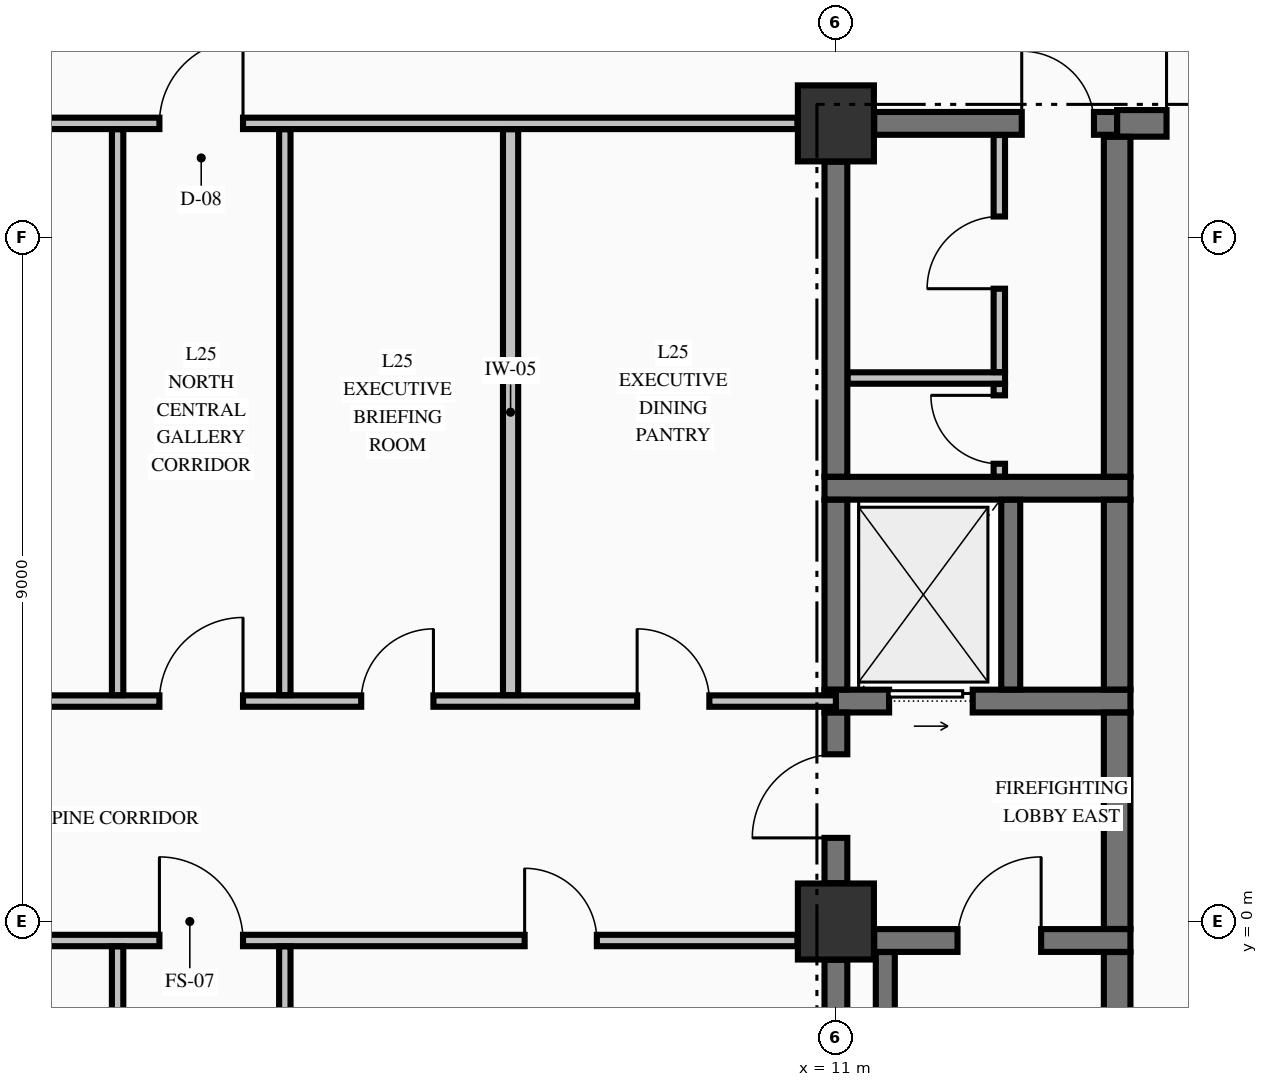
"""IFC4 building model, lengths in metres.
Left out: names, types, materials, properties, quantities, classifications, styles, units other than length and angle.
Written with IfcOpenShell. Run it as: python <this file> out.ifc"""

import sys

from ifc_helpers import new_model, si_unit, direction, frame, frame_2d, origin, origin_2d, place, context, subcontext, project, spatial, rectangle, extrude, element, fill, save


model = new_model("IFC4")
c1 = context("Model", 3, precision=1e-05, world=origin(), true_north=direction((0.0, 1.0)))
c2 = subcontext(c1, "Body", "Model", "MODEL_VIEW")
j1 = project(units=[si_unit("LENGTHUNIT", "METRE"), si_unit("PLANEANGLEUNIT", "RADIAN")], contexts=[c1])
p1 = place(None, origin())
s1 = spatial("IfcSite", under=j1, at=p1, CompositionType="ELEMENT")
p2 = place(p1, origin())
s2 = spatial("IfcBuilding", under=s1, at=p2, CompositionType="ELEMENT")
p3 = place(p2, frame((0.0, 0.0, 102.07)))
s3 = spatial("IfcBuildingStorey", under=s2, at=p3, CompositionType="ELEMENT", Elevation=102.07)
for number, where, z_axis, x_axis in (
    (1, (11.0, 0.0, -0.25), (0.0, 0.0, 1.0), (1.0, 0.0, 0.0)),
    (2, (11.0, 10.5, -0.25), (0.0, 0.0, 1.0), (1.0, 0.0, 0.0)),
):
    element("IfcColumn", number, at=place(p3, frame(where, z_axis=z_axis, x_axis=x_axis)), inside=s3, PredefinedType="COLUMN", context=c2, shape_type="SweptSolid", body=[
        extrude(rectangle(XDim=1.0, YDim=1.0, at=origin_2d()), origin(), (0.0, 0.0, 1.0), 3.57),
    ])
p4 = place(p3, frame((11.504, -0.25, 0.0), z_axis=(0.0, 0.0, 1.0), x_axis=(1.0, 0.0, 0.0)))
e3 = element("IfcWall", 3, at=p4, inside=s3, PredefinedType="SHEAR", context=c2, shape_type="SweptSolid", body=[
    extrude(rectangle(XDim=3.371, YDim=0.3, at=frame_2d((1.686, 0.0))), origin(), (0.0, 0.0, 1.0), 3.32),
])
p5 = place(p4, frame((1.096, 0.0, 0.0)))
e4 = element("IfcOpeningElement", 4, at=p5, cuts=e3, PredefinedType="OPENING", context=c2, shape_type="SweptSolid", body=[
    extrude(rectangle(XDim=1.1, YDim=2.15, at=frame_2d((0.55, 1.075))), frame((0.0, 0.16, 0.0), z_axis=(0.0, -1.0, 0.0), x_axis=(1.0, 0.0, 0.0)), (0.0, 0.0, 1.0), 0.32),
])
p6 = place(p3, frame((10.85, 2.9, 0.0), z_axis=(0.0, 0.0, 1.0), x_axis=(1.0, 0.0, 0.0)))
e5 = element("IfcWall", 5, at=p6, inside=s3, PredefinedType="SHEAR", context=c2, shape_type="SweptSolid", body=[
    extrude(rectangle(XDim=4.025, YDim=0.3, at=frame_2d((2.012, 0.0))), origin(), (0.0, 0.0, 1.0), 3.32),
])
p7 = place(p6, frame((0.85, 0.0, 0.0)))
e6 = element("IfcOpeningElement", 6, at=p7, cuts=e5, PredefinedType="OPENING", context=c2, shape_type="SweptSolid", body=[
    extrude(rectangle(XDim=1.1, YDim=2.2, at=frame_2d((0.55, 1.1))), frame((0.0, 0.16, 0.0), z_axis=(0.0, -1.0, 0.0), x_axis=(1.0, 0.0, 0.0)), (0.0, 0.0, 1.0), 0.32),
])
p8 = place(p3, frame((10.85, 5.7, 0.0), z_axis=(0.0, 0.0, 1.0), x_axis=(1.0, 0.0, 0.0)))
e7 = element("IfcWall", 7, at=p8, inside=s3, PredefinedType="SHEAR", context=c2, shape_type="SweptSolid", body=[
    extrude(rectangle(XDim=4.025, YDim=0.3, at=frame_2d((2.012, 0.0))), origin(), (0.0, 0.0, 1.0), 3.32),
])
p9 = place(p3, frame((11.504, 10.5, 0.0), z_axis=(0.0, 0.0, 1.0), x_axis=(1.0, 0.0, 0.0)))
e8 = element("IfcWall", 8, at=p9, inside=s3, PredefinedType="SHEAR", context=c2, shape_type="SweptSolid", body=[
    extrude(rectangle(XDim=3.196, YDim=0.3, at=frame_2d((1.598, 0.0))), origin(), (0.0, 0.0, 1.0), 3.32),
])
p10 = place(p9, frame((1.941, 0.0, 0.0)))
e9 = element("IfcOpeningElement", 9, at=p10, cuts=e8, PredefinedType="OPENING", context=c2, shape_type="SweptSolid", body=[
    extrude(rectangle(XDim=0.95, YDim=2.15, at=frame_2d((0.475, 1.075))), frame((0.0, 0.16, 0.0), z_axis=(0.0, -1.0, 0.0), x_axis=(1.0, 0.0, 0.0)), (0.0, 0.0, 1.0), 0.32),
])
p11 = place(p3, frame((14.7, 10.5, 0.0), z_axis=(0.0, 0.0, 1.0), x_axis=(1.0, 0.0, 0.0)))
e10 = element("IfcWall", 10, at=p11, inside=s3, PredefinedType="SHEAR", context=c2, shape_type="SweptSolid", body=[
    extrude(rectangle(XDim=4.796, YDim=0.35, at=frame_2d((2.398, 0.0))), origin(), (0.0, 0.0, 1.0), 3.32),
])
p12 = place(p11, frame((0.65, 0.0, 0.0)))
e11 = element("IfcOpeningElement", 11, at=p12, cuts=e10, PredefinedType="OPENING", context=c2, shape_type="SweptSolid", body=[
    extrude(rectangle(XDim=1.2, YDim=2.15, at=frame_2d((0.6, 1.075))), frame((0.0, 0.185, 0.0), z_axis=(0.0, -1.0, 0.0), x_axis=(1.0, 0.0, 0.0)), (0.0, 0.0, 1.0), 0.37),
])
p13 = place(p11, frame((3.225, 0.0, 0.0)))
e12 = element("IfcOpeningElement", 12, at=p13, cuts=e10, PredefinedType="OPENING", context=c2, shape_type="SweptSolid", body=[
    extrude(rectangle(XDim=0.95, YDim=2.15, at=frame_2d((0.475, 1.075))), frame((0.0, 0.185, 0.0), z_axis=(0.0, -1.0, 0.0), x_axis=(1.0, 0.0, 0.0)), (0.0, 0.0, 1.0), 0.37),
])
p14 = place(p3, frame((-10.494, -0.25, 0.0), z_axis=(0.0, 0.0, 1.0), x_axis=(1.0, 0.0, 0.0)))
e13 = element("IfcWall", 13, at=p14, inside=s3, PredefinedType="PARTITIONING", context=c2, shape_type="SweptSolid", body=[
    extrude(rectangle(XDim=20.988, YDim=0.15, at=frame_2d((10.494, 0.0))), origin(), (0.0, 0.0, 1.0), 3.32),
])
p15 = place(p14, frame((12.594, 0.0, 0.0)))
e14 = element("IfcOpeningElement", 14, at=p15, cuts=e13, PredefinedType="OPENING", context=c2, shape_type="SweptSolid", body=[
    extrude(rectangle(XDim=1.1, YDim=2.15, at=frame_2d((0.55, 1.075))), frame((0.0, 0.085, 0.0), z_axis=(0.0, -1.0, 0.0), x_axis=(1.0, 0.0, 0.0)), (0.0, 0.0, 1.0), 0.17),
])
p16 = place(p14, frame((5.249, 0.0, 0.0)))
e15 = element("IfcOpeningElement", 15, at=p16, cuts=e13, PredefinedType="OPENING", context=c2, shape_type="SweptSolid", body=[
    extrude(rectangle(XDim=1.05, YDim=2.15, at=frame_2d((0.525, 1.075))), frame((0.0, 0.085, 0.0), z_axis=(0.0, -1.0, 0.0), x_axis=(1.0, 0.0, 0.0)), (0.0, 0.0, 1.0), 0.17),
])
p17 = place(p14, frame((17.399, 0.0, 0.0)))
e16 = element("IfcOpeningElement", 16, at=p17, cuts=e13, PredefinedType="OPENING", context=c2, shape_type="SweptSolid", body=[
    extrude(rectangle(XDim=0.95, YDim=2.15, at=frame_2d((0.475, 1.075))), frame((0.0, 0.085, 0.0), z_axis=(0.0, -1.0, 0.0), x_axis=(1.0, 0.0, 0.0)), (0.0, 0.0, 1.0), 0.17),
])
p18 = place(p3, frame((-11.0, 2.9, 0.0), z_axis=(0.0, 0.0, 1.0), x_axis=(1.0, 0.0, 0.0)))
e17 = element("IfcWall", 17, at=p18, inside=s3, PredefinedType="PARTITIONING", context=c2, shape_type="SweptSolid", body=[
    extrude(rectangle(XDim=22.0, YDim=0.15, at=frame_2d((11.0, 0.0))), origin(), (0.0, 0.0, 1.0), 3.32),
])
p19 = place(p18, frame((13.1, 0.0, 0.0)))
e18 = element("IfcOpeningElement", 18, at=p19, cuts=e17, PredefinedType="OPENING", context=c2, shape_type="SweptSolid", body=[
    extrude(rectangle(XDim=1.1, YDim=2.15, at=frame_2d((0.55, 1.075))), frame((0.0, 0.085, 0.0), z_axis=(0.0, -1.0, 0.0), x_axis=(1.0, 0.0, 0.0)), (0.0, 0.0, 1.0), 0.17),
])
p20 = place(p18, frame((5.755, 0.0, 0.0)))
e19 = element("IfcOpeningElement", 19, at=p20, cuts=e17, PredefinedType="OPENING", context=c2, shape_type="SweptSolid", body=[
    extrude(rectangle(XDim=1.05, YDim=2.15, at=frame_2d((0.525, 1.075))), frame((0.0, 0.085, 0.0), z_axis=(0.0, -1.0, 0.0), x_axis=(1.0, 0.0, 0.0)), (0.0, 0.0, 1.0), 0.17),
])
p21 = place(p18, frame((15.755, 0.0, 0.0)))
e20 = element("IfcOpeningElement", 20, at=p21, cuts=e17, PredefinedType="OPENING", context=c2, shape_type="SweptSolid", body=[
    extrude(rectangle(XDim=0.95, YDim=2.15, at=frame_2d((0.475, 1.075))), frame((0.0, 0.085, 0.0), z_axis=(0.0, -1.0, 0.0), x_axis=(1.0, 0.0, 0.0)), (0.0, 0.0, 1.0), 0.17),
])
p22 = place(p18, frame((19.385, 0.0, 0.0)))
e21 = element("IfcOpeningElement", 21, at=p22, cuts=e17, PredefinedType="OPENING", context=c2, shape_type="SweptSolid", body=[
    extrude(rectangle(XDim=0.95, YDim=2.15, at=frame_2d((0.475, 1.075))), frame((0.0, 0.085, 0.0), z_axis=(0.0, -1.0, 0.0), x_axis=(1.0, 0.0, 0.0)), (0.0, 0.0, 1.0), 0.17),
])
p23 = place(p3, frame((11.153, 7.15, 0.0), z_axis=(0.0, 0.0, 1.0), x_axis=(1.0, 0.0, 0.0)))
e22 = element("IfcWall", 22, at=p23, inside=s3, PredefinedType="PARTITIONING", context=c2, shape_type="SweptSolid", body=[
    extrude(rectangle(XDim=2.072, YDim=0.15, at=frame_2d((1.036, 0.0))), origin(), (0.0, 0.0, 1.0), 3.32),
])
p24 = place(p3, frame((-10.494, 10.5, 0.0), z_axis=(0.0, 0.0, 1.0), x_axis=(1.0, 0.0, 0.0)))
e23 = element("IfcWall", 23, at=p24, inside=s3, PredefinedType="PARTITIONING", context=c2, shape_type="SweptSolid", body=[
    extrude(rectangle(XDim=20.988, YDim=0.15, at=frame_2d((10.494, 0.0))), origin(), (0.0, 0.0, 1.0), 3.32),
])
p25 = place(p24, frame((12.594, 0.0, 0.0)))
e24 = element("IfcOpeningElement", 24, at=p25, cuts=e23, PredefinedType="OPENING", context=c2, shape_type="SweptSolid", body=[
    extrude(rectangle(XDim=1.1, YDim=2.15, at=frame_2d((0.55, 1.075))), frame((0.0, 0.085, 0.0), z_axis=(0.0, -1.0, 0.0), x_axis=(1.0, 0.0, 0.0)), (0.0, 0.0, 1.0), 0.17),
])
p26 = place(p3, frame((11.0, -9.446, 0.0), z_axis=(0.0, 0.0, 1.0), x_axis=(0.0, 1.0, 0.0)))
e25 = element("IfcWall", 25, at=p26, inside=s3, PredefinedType="SHEAR", context=c2, shape_type="SweptSolid", body=[
    extrude(rectangle(XDim=8.942, YDim=0.3, at=frame_2d((4.471, 0.0))), origin(), (0.0, 0.0, 1.0), 3.32),
])
p27 = place(p3, frame((11.0, 0.504, 0.0), z_axis=(0.0, 0.0, 1.0), x_axis=(0.0, 1.0, 0.0)))
e26 = element("IfcWall", 26, at=p27, inside=s3, PredefinedType="SHEAR", context=c2, shape_type="SweptSolid", body=[
    extrude(rectangle(XDim=2.244, YDim=0.3, at=frame_2d((1.122, 0.0))), origin(), (0.0, 0.0, 1.0), 3.32),
])
p28 = place(p27, frame((0.596, 0.0, 0.0)))
e27 = element("IfcOpeningElement", 27, at=p28, cuts=e26, PredefinedType="OPENING", context=c2, shape_type="SweptSolid", body=[
    extrude(rectangle(XDim=1.1, YDim=2.15, at=frame_2d((0.55, 1.075))), frame((0.0, 0.16, 0.0), z_axis=(0.0, -1.0, 0.0), x_axis=(1.0, 0.0, 0.0)), (0.0, 0.0, 1.0), 0.32),
])
p29 = place(p3, frame((11.0, 3.052, 0.0), z_axis=(0.0, 0.0, 1.0), x_axis=(0.0, 1.0, 0.0)))
e28 = element("IfcWall", 28, at=p29, inside=s3, PredefinedType="SHEAR", context=c2, shape_type="SweptSolid", body=[
    extrude(rectangle(XDim=2.496, YDim=0.3, at=frame_2d((1.248, 0.0))), origin(), (0.0, 0.0, 1.0), 3.32),
])
p30 = place(p3, frame((11.0, 5.852, 0.0), z_axis=(0.0, 0.0, 1.0), x_axis=(0.0, 1.0, 0.0)))
e29 = element("IfcWall", 29, at=p30, inside=s3, PredefinedType="SHEAR", context=c2, shape_type="SweptSolid", body=[
    extrude(rectangle(XDim=4.144, YDim=0.3, at=frame_2d((2.072, 0.0))), origin(), (0.0, 0.0, 1.0), 3.32),
])
p31 = place(p3, frame((11.65, -9.798, 0.0), z_axis=(0.0, 0.0, 1.0), x_axis=(0.0, 1.0, 0.0)))
e30 = element("IfcWall", 30, at=p31, inside=s3, PredefinedType="SOLIDWALL", context=c2, shape_type="SweptSolid", body=[
    extrude(rectangle(XDim=9.396, YDim=0.25, at=frame_2d((4.698, 0.0))), origin(), (0.0, 0.0, 1.0), 3.32),
])
p32 = place(p3, frame((13.3, 3.052, 0.0), z_axis=(0.0, 0.0, 1.0), x_axis=(0.0, 1.0, 0.0)))
e31 = element("IfcWall", 31, at=p32, inside=s3, PredefinedType="SOLIDWALL", context=c2, shape_type="SweptSolid", body=[
    extrude(rectangle(XDim=2.496, YDim=0.25, at=frame_2d((1.248, 0.0))), origin(), (0.0, 0.0, 1.0), 3.32),
])
p33 = place(p3, frame((14.7, -9.773, 0.0), z_axis=(0.0, 0.0, 1.0), x_axis=(0.0, 1.0, 0.0)))
e32 = element("IfcWall", 32, at=p33, inside=s3, PredefinedType="SHEAR", context=c2, shape_type="SweptSolid", body=[
    extrude(rectangle(XDim=9.371, YDim=0.35, at=frame_2d((4.686, 0.0))), origin(), (0.0, 0.0, 1.0), 3.32),
])
p34 = place(p3, frame((14.7, -0.098, 0.0), z_axis=(0.0, 0.0, 1.0), x_axis=(0.0, 1.0, 0.0)))
e33 = element("IfcWall", 33, at=p34, inside=s3, PredefinedType="SHEAR", context=c2, shape_type="SweptSolid", body=[
    extrude(rectangle(XDim=2.846, YDim=0.35, at=frame_2d((1.423, 0.0))), origin(), (0.0, 0.0, 1.0), 3.32),
])
p35 = place(p3, frame((14.7, 3.052, 0.0), z_axis=(0.0, 0.0, 1.0), x_axis=(0.0, 1.0, 0.0)))
e34 = element("IfcWall", 34, at=p35, inside=s3, PredefinedType="SHEAR", context=c2, shape_type="SweptSolid", body=[
    extrude(rectangle(XDim=2.496, YDim=0.35, at=frame_2d((1.248, 0.0))), origin(), (0.0, 0.0, 1.0), 3.32),
])
p36 = place(p3, frame((14.7, 5.852, 0.0), z_axis=(0.0, 0.0, 1.0), x_axis=(0.0, 1.0, 0.0)))
e35 = element("IfcWall", 35, at=p36, inside=s3, PredefinedType="SHEAR", context=c2, shape_type="SweptSolid", body=[
    extrude(rectangle(XDim=4.471, YDim=0.35, at=frame_2d((2.235, 0.0))), origin(), (0.0, 0.0, 1.0), 3.32),
])
p37 = place(p3, frame((1.55, -9.872, 0.0), z_axis=(0.0, 0.0, 1.0), x_axis=(0.0, 1.0, 0.0)))
e36 = element("IfcWall", 36, at=p37, inside=s3, PredefinedType="PARTITIONING", context=c2, shape_type="SweptSolid", body=[
    extrude(rectangle(XDim=9.544, YDim=0.15, at=frame_2d((4.772, 0.0))), origin(), (0.0, 0.0, 1.0), 3.32),
])
p38 = place(p3, frame((1.55, 2.978, 0.0), z_axis=(0.0, 0.0, 1.0), x_axis=(0.0, 1.0, 0.0)))
e37 = element("IfcWall", 37, at=p38, inside=s3, PredefinedType="PARTITIONING", context=c2, shape_type="SweptSolid", body=[
    extrude(rectangle(XDim=7.444, YDim=0.15, at=frame_2d((3.722, 0.0))), origin(), (0.0, 0.0, 1.0), 3.32),
])
p39 = place(p3, frame((3.75, -4.147, 0.0), z_axis=(0.0, 0.0, 1.0), x_axis=(0.0, 1.0, 0.0)))
e38 = element("IfcWall", 38, at=p39, inside=s3, PredefinedType="PARTITIONING", context=c2, shape_type="SweptSolid", body=[
    extrude(rectangle(XDim=3.819, YDim=0.15, at=frame_2d((1.91, 0.0))), origin(), (0.0, 0.0, 1.0), 3.32),
])
p40 = place(p3, frame((3.75, 2.978, 0.0), z_axis=(0.0, 0.0, 1.0), x_axis=(0.0, 1.0, 0.0)))
e39 = element("IfcWall", 39, at=p40, inside=s3, PredefinedType="PARTITIONING", context=c2, shape_type="SweptSolid", body=[
    extrude(rectangle(XDim=7.444, YDim=0.15, at=frame_2d((3.722, 0.0))), origin(), (0.0, 0.0, 1.0), 3.32),
])
p41 = place(p3, frame((6.72, 2.978, 0.0), z_axis=(0.0, 0.0, 1.0), x_axis=(0.0, 1.0, 0.0)))
e40 = element("IfcWall", 40, at=p41, inside=s3, PredefinedType="PARTITIONING", context=c2, shape_type="SweptSolid", body=[
    extrude(rectangle(XDim=7.444, YDim=0.2, at=frame_2d((3.722, 0.0))), origin(), (0.0, 0.0, 1.0), 3.32),
])
p42 = place(p3, frame((13.15, 5.853, 0.0), z_axis=(0.0, 0.0, 1.0), x_axis=(0.0, 1.0, 0.0)))
e41 = element("IfcWall", 41, at=p42, inside=s3, PredefinedType="PARTITIONING", context=c2, shape_type="SweptSolid", body=[
    extrude(rectangle(XDim=1.219, YDim=0.15, at=frame_2d((0.609, 0.0))), origin(), (0.0, 0.0, 1.0), 3.32),
])
p43 = place(p42, frame((0.169, 0.0, 0.0)))
e42 = element("IfcOpeningElement", 42, at=p43, cuts=e41, PredefinedType="OPENING", context=c2, shape_type="SweptSolid", body=[
    extrude(rectangle(XDim=0.9, YDim=2.15, at=frame_2d((0.45, 1.075))), frame((0.0, 0.085, 0.0), z_axis=(0.0, -1.0, 0.0), x_axis=(1.0, 0.0, 0.0)), (0.0, 0.0, 1.0), 0.17),
])
p44 = place(p3, frame((13.15, 7.228, 0.0), z_axis=(0.0, 0.0, 1.0), x_axis=(0.0, 1.0, 0.0)))
e43 = element("IfcWall", 43, at=p44, inside=s3, PredefinedType="PARTITIONING", context=c2, shape_type="SweptSolid", body=[
    extrude(rectangle(XDim=3.119, YDim=0.15, at=frame_2d((1.56, 0.0))), origin(), (0.0, 0.0, 1.0), 3.32),
])
p45 = place(p44, frame((1.097, 0.0, 0.0)))
e44 = element("IfcOpeningElement", 44, at=p45, cuts=e43, PredefinedType="OPENING", context=c2, shape_type="SweptSolid", body=[
    extrude(rectangle(XDim=0.95, YDim=2.15, at=frame_2d((0.475, 1.075))), frame((0.0, 0.085, 0.0), z_axis=(0.0, -1.0, 0.0), x_axis=(1.0, 0.0, 0.0)), (0.0, 0.0, 1.0), 0.17),
])
p46 = place(p5, origin())
e45 = element("IfcDoor", 45, at=p46, inside=s3, OperationType="SINGLE_SWING_RIGHT", PredefinedType="DOOR", context=c2, shape_type="SweptSolid", body=[
    extrude(rectangle(XDim=1.1, YDim=2.15, at=frame_2d((0.55, 1.075))), frame((0.0, 0.025, 0.0), z_axis=(0.0, -1.0, 0.0), x_axis=(1.0, 0.0, 0.0)), (0.0, 0.0, 1.0), 0.05),
])
fill(e4, e45)
p47 = place(p28, origin())
e46 = element("IfcDoor", 46, at=p47, inside=s3, OperationType="SINGLE_SWING_LEFT", PredefinedType="DOOR", context=c2, shape_type="SweptSolid", body=[
    extrude(rectangle(XDim=1.1, YDim=2.15, at=frame_2d((0.55, 1.075))), frame((0.0, 0.025, 0.0), z_axis=(0.0, -1.0, 0.0), x_axis=(1.0, 0.0, 0.0)), (0.0, 0.0, 1.0), 0.05),
])
fill(e27, e46)
p48 = place(p7, origin())
e47 = element("IfcDoor", 47, at=p48, inside=s3, OperationType="SLIDING_TO_RIGHT", PredefinedType="DOOR", context=c2, shape_type="SweptSolid", body=[
    extrude(rectangle(XDim=1.1, YDim=2.2, at=frame_2d((0.55, 1.1))), frame((0.0, 0.025, 0.0), z_axis=(0.0, -1.0, 0.0), x_axis=(1.0, 0.0, 0.0)), (0.0, 0.0, 1.0), 0.05),
])
fill(e6, e47)
p49 = place(p10, origin())
e48 = element("IfcDoor", 48, at=p49, inside=s3, OperationType="SINGLE_SWING_LEFT", PredefinedType="DOOR", context=c2, shape_type="SweptSolid", body=[
    extrude(rectangle(XDim=0.95, YDim=2.15, at=frame_2d((0.475, 1.075))), frame((0.0, 0.025, 0.0), z_axis=(0.0, -1.0, 0.0), x_axis=(1.0, 0.0, 0.0)), (0.0, 0.0, 1.0), 0.05),
])
fill(e9, e48)
p50 = place(p43, origin())
e49 = element("IfcDoor", 49, at=p50, inside=s3, OperationType="SINGLE_SWING_RIGHT", PredefinedType="DOOR", context=c2, shape_type="SweptSolid", body=[
    extrude(rectangle(XDim=0.9, YDim=2.15, at=frame_2d((0.45, 1.075))), frame((0.0, 0.025, 0.0), z_axis=(0.0, -1.0, 0.0), x_axis=(1.0, 0.0, 0.0)), (0.0, 0.0, 1.0), 0.05),
])
fill(e42, e49)
p51 = place(p45, origin())
e50 = element("IfcDoor", 50, at=p51, inside=s3, OperationType="SINGLE_SWING_LEFT", PredefinedType="DOOR", context=c2, shape_type="SweptSolid", body=[
    extrude(rectangle(XDim=0.95, YDim=2.15, at=frame_2d((0.475, 1.075))), frame((0.0, 0.025, 0.0), z_axis=(0.0, -1.0, 0.0), x_axis=(1.0, 0.0, 0.0)), (0.0, 0.0, 1.0), 0.05),
])
fill(e44, e50)
p52 = place(p12, origin())
e51 = element("IfcDoor", 51, at=p52, inside=s3, OperationType="SINGLE_SWING_LEFT", PredefinedType="DOOR", context=c2, shape_type="SweptSolid", body=[
    extrude(rectangle(XDim=1.2, YDim=2.15, at=frame_2d((0.6, 1.075))), frame((0.0, 0.025, 0.0), z_axis=(0.0, -1.0, 0.0), x_axis=(1.0, 0.0, 0.0)), (0.0, 0.0, 1.0), 0.05),
])
fill(e11, e51)
p53 = place(p25, origin())
e52 = element("IfcDoor", 52, at=p53, inside=s3, OperationType="SINGLE_SWING_RIGHT", PredefinedType="DOOR", context=c2, shape_type="SweptSolid", body=[
    extrude(rectangle(XDim=1.1, YDim=2.15, at=frame_2d((0.55, 1.075))), frame((0.0, 0.025, 0.0), z_axis=(0.0, -1.0, 0.0), x_axis=(1.0, 0.0, 0.0)), (0.0, 0.0, 1.0), 0.05),
])
fill(e24, e52)
p54 = place(p19, origin())
e53 = element("IfcDoor", 53, at=p54, inside=s3, OperationType="SINGLE_SWING_RIGHT", PredefinedType="DOOR", context=c2, shape_type="SweptSolid", body=[
    extrude(rectangle(XDim=1.1, YDim=2.15, at=frame_2d((0.55, 1.075))), frame((0.0, 0.025, 0.0), z_axis=(0.0, -1.0, 0.0), x_axis=(1.0, 0.0, 0.0)), (0.0, 0.0, 1.0), 0.05),
])
fill(e18, e53)
p55 = place(p15, origin())
e54 = element("IfcDoor", 54, at=p55, inside=s3, OperationType="SINGLE_SWING_LEFT", PredefinedType="DOOR", context=c2, shape_type="SweptSolid", body=[
    extrude(rectangle(XDim=1.1, YDim=2.15, at=frame_2d((0.55, 1.075))), frame((0.0, 0.025, 0.0), z_axis=(0.0, -1.0, 0.0), x_axis=(1.0, 0.0, 0.0)), (0.0, 0.0, 1.0), 0.05),
])
fill(e14, e54)
p56 = place(p21, origin())
e55 = element("IfcDoor", 55, at=p56, inside=s3, OperationType="SINGLE_SWING_RIGHT", PredefinedType="DOOR", context=c2, shape_type="SweptSolid", body=[
    extrude(rectangle(XDim=0.95, YDim=2.15, at=frame_2d((0.475, 1.075))), frame((0.0, 0.025, 0.0), z_axis=(0.0, -1.0, 0.0), x_axis=(1.0, 0.0, 0.0)), (0.0, 0.0, 1.0), 0.05),
])
fill(e20, e55)
p57 = place(p22, origin())
e56 = element("IfcDoor", 56, at=p57, inside=s3, OperationType="SINGLE_SWING_LEFT", PredefinedType="DOOR", context=c2, shape_type="SweptSolid", body=[
    extrude(rectangle(XDim=0.95, YDim=2.15, at=frame_2d((0.475, 1.075))), frame((0.0, 0.025, 0.0), z_axis=(0.0, -1.0, 0.0), x_axis=(1.0, 0.0, 0.0)), (0.0, 0.0, 1.0), 0.05),
])
fill(e21, e56)
p58 = place(p17, origin())
e57 = element("IfcDoor", 57, at=p58, inside=s3, OperationType="SINGLE_SWING_LEFT", PredefinedType="DOOR", context=c2, shape_type="SweptSolid", body=[
    extrude(rectangle(XDim=0.95, YDim=2.15, at=frame_2d((0.475, 1.075))), frame((0.0, 0.025, 0.0), z_axis=(0.0, -1.0, 0.0), x_axis=(1.0, 0.0, 0.0)), (0.0, 0.0, 1.0), 0.05),
])
fill(e16, e57)
save(model, sys.argv[1])
